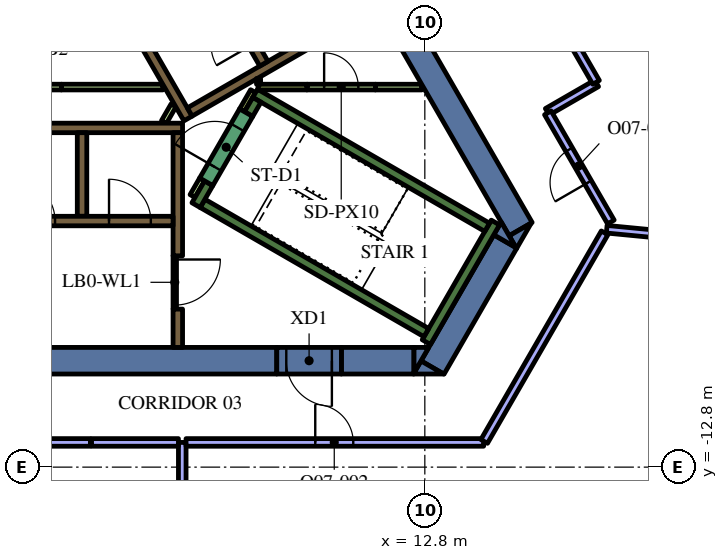
"""IFC4 building model, lengths in metres.
Left out: names, types, materials, properties, quantities, classifications, styles, units other than length and angle.
Written with IfcOpenShell. Run it as: python <this file> out.ifc"""

import sys

from ifc_helpers import new_model, si_unit, direction, frame, frame_2d, origin, place, context, subcontext, project, spatial, polyline, rectangle, outline, extrude, element, fill, save


model = new_model("IFC4")
c1 = context("Model", 3, precision=1e-05, world=origin(), true_north=direction((0.0, 1.0)))
c2 = subcontext(c1, "Body", "Model", "MODEL_VIEW")
j1 = project(units=[si_unit("LENGTHUNIT", "METRE"), si_unit("PLANEANGLEUNIT", "RADIAN")], contexts=[c1])
p1 = place(None, origin())
s1 = spatial("IfcSite", under=j1, at=p1, CompositionType="ELEMENT")
p2 = place(p1, origin())
s2 = spatial("IfcBuilding", under=s1, at=p2, CompositionType="ELEMENT")
p3 = place(p2, frame((0.0, 0.0, 214.2)))
s3 = spatial("IfcBuildingStorey", under=s2, at=p3, CompositionType="ELEMENT", Elevation=214.2)
p4 = place(p3, frame((9.085, 4.264, 0.0), z_axis=(0.0, 0.0, 1.0), x_axis=(0.499998082512, -0.866026510844, 0.0)))
e1 = element("IfcWall", 1, at=p4, inside=s3, PredefinedType="SOLIDWALL", context=c2, shape_type="SweptSolid", body=[
    extrude(rectangle(XDim=12.472, YDim=0.7, at=frame_2d((6.236, 0.0))), origin(), (0.0, 0.0, 1.0), 4.2),
])
p5 = place(p3, origin())
e2 = element("IfcWall", 2, at=p5, inside=s3, PredefinedType="SOLIDWALL", context=c2, shape_type="SweptSolid", body=[
    extrude(outline(polyline([(15.213, -7.05), (15.019, -6.714), (15.601, -6.378), (15.213, -7.05)])), origin(), (0.0, 0.0, 1.0), 4.2),
])
p6 = place(p3, frame((13.003, -10.179, 0.0), z_axis=(0.0, 0.0, 1.0), x_axis=(0.499972675833, 0.866041178825, 0.0)))
e3 = element("IfcWall", 3, at=p6, inside=s3, PredefinedType="SOLIDWALL", context=c2, shape_type="SweptSolid", body=[
    extrude(rectangle(XDim=3.829, YDim=0.7, at=frame_2d((1.915, 0.0))), origin(), (0.0, 0.0, 1.0), 4.2),
])
e4 = element("IfcWall", 4, at=p5, inside=s3, PredefinedType="SOLIDWALL", context=c2, shape_type="SweptSolid", body=[
    extrude(outline(polyline([(12.698, -10.005), (13.296, -10.35), (12.5, -10.35), (12.698, -10.005)])), origin(), (0.0, 0.0, 1.0), 4.2),
])
e5 = element("IfcWall", 5, at=p5, inside=s3, PredefinedType="SOLIDWALL", context=c2, shape_type="SweptSolid", body=[
    extrude(outline(polyline([(14.809, -6.35), (15.197, -7.022), (14.615, -6.686), (14.809, -6.35)])), origin(), (0.0, 0.0, 1.0), 4.2),
])
p7 = place(p3, frame((10.604, -10.0, 0.0), z_axis=(0.0, 0.0, 1.0), x_axis=(1.0, 0.0, 0.0)))
e6 = element("IfcWall", 6, at=p7, inside=s3, PredefinedType="SOLIDWALL", context=c2, shape_type="SweptSolid", body=[
    extrude(rectangle(XDim=1.909, YDim=0.7, at=frame_2d((0.955, 0.0))), origin(), (0.0, 0.0, 1.0), 4.2),
])
e7 = element("IfcWall", 7, at=p5, inside=s3, PredefinedType="SOLIDWALL", context=c2, shape_type="SweptSolid", body=[
    extrude(outline(polyline([(12.904, -9.65), (12.516, -10.322), (12.516, -9.65), (12.904, -9.65)])), origin(), (0.0, 0.0, 1.0), 4.2),
])
p8 = place(p3, frame((-10.556, -10.0, 0.0), z_axis=(0.0, 0.0, 1.0), x_axis=(1.0, 0.0, 0.0)))
e8 = element("IfcWall", 8, at=p8, inside=s3, PredefinedType="SOLIDWALL", context=c2, shape_type="SweptSolid", body=[
    extrude(rectangle(XDim=19.461, YDim=0.7, at=frame_2d((9.73, 0.0))), origin(), (0.0, 0.0, 1.0), 4.2),
])
p9 = place(p3, frame((12.84, -9.511, 0.0), z_axis=(0.0, 0.0, 1.0), x_axis=(0.500048121057, 0.865997619297, 0.0)))
e9 = element("IfcWall", 9, at=p9, inside=s3, PredefinedType="SOLIDWALL", context=c2, shape_type="SweptSolid", body=[
    extrude(rectangle(XDim=3.634, YDim=0.25, at=frame_2d((1.817, 0.0))), origin(), (0.0, 0.0, 1.0), 4.2),
])
p10 = place(p3, frame((12.84, -9.261, 0.0), z_axis=(0.0, 0.0, 1.0), x_axis=(-0.866013990052, 0.500019768644, 0.0)))
e10 = element("IfcWall", 10, at=p10, inside=s3, PredefinedType="SOLIDWALL", context=c2, shape_type="SweptSolid", body=[
    extrude(rectangle(XDim=6.8, YDim=0.25, at=frame_2d((3.4, 0.0))), origin(), (0.0, 0.0, 1.0), 4.2),
])
p11 = place(p3, frame((7.113, -5.33, 0.0), z_axis=(0.0, 0.0, 1.0), x_axis=(-0.499965889992, -0.866045096311, 0.0)))
e11 = element("IfcWall", 11, at=p11, inside=s3, PredefinedType="SOLIDWALL", context=c2, shape_type="SweptSolid", body=[
    extrude(rectangle(XDim=0.666, YDim=0.25, at=frame_2d((0.333, 0.0))), origin(), (0.0, 0.0, 1.0), 4.2),
])
p12 = place(p3, frame((8.334, -2.964, 0.0), z_axis=(0.0, 0.0, 1.0), x_axis=(0.866016039709, -0.500016218704, 0.0)))
e12 = element("IfcWall", 12, at=p12, inside=s3, PredefinedType="SOLIDWALL", context=c2, shape_type="SweptSolid", body=[
    extrude(rectangle(XDim=7.05, YDim=0.25, at=frame_2d((3.525, 0.0))), origin(), (0.0, 0.0, 1.0), 4.2),
])
p13 = place(p3, frame((8.163, -3.511, 0.0), z_axis=(0.0, 0.0, 1.0), x_axis=(0.500127794843, 0.865951608824, 0.0)))
e13 = element("IfcWall", 13, at=p13, inside=s3, PredefinedType="SOLIDWALL", context=c2, shape_type="SweptSolid", body=[
    extrude(rectangle(XDim=0.435, YDim=0.25, at=frame_2d((0.217, 0.0))), origin(), (0.0, 0.0, 1.0), 4.2),
])
p14 = place(p3, frame((-5.806, -3.875, 0.0), z_axis=(0.0, 0.0, 1.0), x_axis=(1.0, 0.0, 0.0)))
e14 = element("IfcWall", 14, at=p14, inside=s3, PredefinedType="SOLIDWALL", context=c2, shape_type="SweptSolid", body=[
    extrude(rectangle(XDim=12.231, YDim=0.25, at=frame_2d((6.116, 0.0))), origin(), (0.0, 0.0, 1.0), 4.2),
])
p15 = place(p3, frame((6.3, -7.24, 0.0), z_axis=(0.0, 0.0, 1.0), x_axis=(0.0, 1.0, 0.0)))
e15 = element("IfcWall", 15, at=p15, inside=s3, PredefinedType="SOLIDWALL", context=c2, shape_type="SweptSolid", body=[
    extrude(rectangle(XDim=3.24, YDim=0.25, at=frame_2d((1.62, 0.0))), origin(), (0.0, 0.0, 1.0), 4.2),
])
p16 = place(p3, frame((6.3, -9.65, 0.0), z_axis=(0.0, 0.0, 1.0), x_axis=(0.0, 1.0, 0.0)))
e16 = element("IfcWall", 16, at=p16, inside=s3, PredefinedType="SOLIDWALL", context=c2, shape_type="SweptSolid", body=[
    extrude(rectangle(XDim=1.008, YDim=0.25, at=frame_2d((0.504, 0.0))), origin(), (0.0, 0.0, 1.0), 4.2),
])
p17 = place(p3, frame((3.78, -4.0, 0.0), z_axis=(0.0, 0.0, 1.0), x_axis=(0.0, -1.0, 0.0)))
e17 = element("IfcWall", 17, at=p17, inside=s3, PredefinedType="SOLIDWALL", context=c2, shape_type="SweptSolid", body=[
    extrude(rectangle(XDim=2.2, YDim=0.25, at=frame_2d((1.1, 0.0))), origin(), (0.0, 0.0, 1.0), 4.2),
])
e18 = element("IfcWall", 18, at=p5, inside=s3, PredefinedType="SOLIDWALL", context=c2, shape_type="SweptSolid", body=[
    extrude(outline(polyline([(0.332, 6.925), (0.335, 6.925), (0.335, 6.925), (0.335, 6.925), (0.335, 7.075), (0.335, 7.075), (0.335, 7.075), (0.245, 7.075), (0.035, 7.439), (0.252, 7.564), (0.377, 7.348), (1.512, 5.382), (1.637, 5.165), (2.221, 4.153), (2.771, 3.199), (2.896, 2.983), (3.138, 2.564), (4.031, 1.017), (4.156, 0.801), (5.292, -1.165), (5.417, -1.382), (6.073, -2.519), (6.552, -3.348), (6.677, -3.564), (6.46, -3.689), (0.332, 6.925)])), origin(), (0.0, 0.0, 1.0), 4.2),
])
p18 = place(p3, frame((11.507, -0.631, 0.0), z_axis=(0.0, 0.0, 1.0), x_axis=(-0.866011447264, -0.500024172624, 0.0)))
e19 = element("IfcWall", 19, at=p18, inside=s3, PredefinedType="SOLIDWALL", context=c2, shape_type="SweptSolid", body=[
    extrude(rectangle(XDim=5.65, YDim=0.25, at=frame_2d((2.825, 0.0))), origin(), (0.0, 0.0, 1.0), 4.2),
])
p19 = place(p3, frame((3.238, -2.8, 0.0), z_axis=(0.0, 0.0, 1.0), x_axis=(1.0, 0.0, 0.0)))
e20 = element("IfcWall", 20, at=p19, inside=s3, PredefinedType="PARTITIONING", context=c2, shape_type="SweptSolid", body=[
    extrude(rectangle(XDim=2.672, YDim=0.15, at=frame_2d((1.336, 0.0))), origin(), (0.0, 0.0, 1.0), 3.45),
])
p20 = place(p3, frame((8.412, -2.8, 0.0), z_axis=(0.0, 0.0, 1.0), x_axis=(1.0, 0.0, 0.0)))
e21 = element("IfcWall", 21, at=p20, inside=s3, PredefinedType="PARTITIONING", context=c2, shape_type="SweptSolid", body=[
    extrude(rectangle(XDim=1.288, YDim=0.15, at=frame_2d((0.644, 0.0))), origin(), (0.0, 0.0, 1.0), 4.2),
])
p21 = place(p3, frame((8.37, -2.65, 0.0), z_axis=(0.0, 0.0, 1.0), x_axis=(1.0, 0.0, 0.0)))
e22 = element("IfcWall", 22, at=p21, inside=s3, PredefinedType="PARTITIONING", context=c2, shape_type="SweptSolid", body=[
    extrude(rectangle(XDim=0.108, YDim=0.15, at=frame_2d((0.054, 0.0))), origin(), (0.0, 0.0, 1.0), 4.2),
])
p22 = place(p3, frame((8.281, -2.907, 0.0), z_axis=(0.0, 0.0, 1.0), x_axis=(-0.500193841991, -0.86591346013, 0.0)))
e23 = element("IfcWall", 23, at=p22, inside=s3, PredefinedType="PARTITIONING", context=c2, shape_type="SweptSolid", body=[
    extrude(rectangle(XDim=0.583, YDim=0.15, at=frame_2d((0.292, 0.0))), origin(), (0.0, 0.0, 1.0), 4.2),
])
p23 = place(p3, frame((11.5, -2.801, 0.0), z_axis=(0.0, 0.0, 1.0), x_axis=(1.0, 0.0, 0.0)))
e24 = element("IfcWall", 24, at=p23, inside=s3, PredefinedType="PARTITIONING", context=c2, shape_type="SweptSolid", body=[
    extrude(rectangle(XDim=1.222, YDim=0.15, at=frame_2d((0.611, 0.0))), origin(), (0.0, 0.0, 1.0), 3.45),
])
p24 = place(p3, frame((6.688, -5.667, 0.0), z_axis=(0.0, 0.0, 1.0), x_axis=(0.499834152157, 0.86612113491, 0.0)))
e25 = element("IfcWall", 25, at=p24, inside=s3, PredefinedType="PARTITIONING", context=c2, shape_type="SweptSolid", body=[
    extrude(rectangle(XDim=0.505, YDim=0.15, at=frame_2d((0.252, 0.0))), origin(), (0.0, 0.0, 1.0), 3.45),
])
p25 = place(p3, frame((5.936, -3.718, 0.0), z_axis=(0.0, 0.0, 1.0), x_axis=(0.499890179513, 0.866088799389, 0.0)))
e26 = element("IfcWall", 26, at=p25, inside=s3, PredefinedType="PARTITIONING", context=c2, shape_type="SweptSolid", body=[
    extrude(rectangle(XDim=0.504, YDim=0.15, at=frame_2d((0.252, 0.0))), origin(), (0.0, 0.0, 1.0), 3.45),
])
p26 = place(p3, frame((-6.175, -6.325, 0.0), z_axis=(0.0, 0.0, 1.0), x_axis=(1.0, 0.0, 0.0)))
e27 = element("IfcWall", 27, at=p26, inside=s3, PredefinedType="SOLIDWALL", context=c2, shape_type="SweptSolid", body=[
    extrude(rectangle(XDim=12.35, YDim=0.25, at=frame_2d((6.175, 0.0))), origin(), (0.0, 0.0, 1.0), 4.2),
])
p27 = place(p26, frame((0.585, 0.0, 0.0)))
e28 = element("IfcOpeningElement", 28, at=p27, cuts=e27, PredefinedType="OPENING", context=c2, shape_type="SweptSolid", body=[
    extrude(rectangle(XDim=1.1, YDim=2.1, at=frame_2d((0.55, 1.05))), frame((0.0, 0.135, 0.0), z_axis=(0.0, -1.0, 0.0), x_axis=(1.0, 0.0, 0.0)), (0.0, 0.0, 1.0), 0.27),
])
p28 = place(p26, frame((3.105, 0.0, 0.0)))
e29 = element("IfcOpeningElement", 29, at=p28, cuts=e27, PredefinedType="OPENING", context=c2, shape_type="SweptSolid", body=[
    extrude(rectangle(XDim=1.1, YDim=2.1, at=frame_2d((0.55, 1.05))), frame((0.0, 0.135, 0.0), z_axis=(0.0, -1.0, 0.0), x_axis=(1.0, 0.0, 0.0)), (0.0, 0.0, 1.0), 0.27),
])
p29 = place(p26, frame((5.625, 0.0, 0.0)))
e30 = element("IfcOpeningElement", 30, at=p29, cuts=e27, PredefinedType="OPENING", context=c2, shape_type="SweptSolid", body=[
    extrude(rectangle(XDim=1.1, YDim=2.1, at=frame_2d((0.55, 1.05))), frame((0.0, 0.135, 0.0), z_axis=(0.0, -1.0, 0.0), x_axis=(1.0, 0.0, 0.0)), (0.0, 0.0, 1.0), 0.27),
])
p30 = place(p26, frame((8.145, 0.0, 0.0)))
e31 = element("IfcOpeningElement", 31, at=p30, cuts=e27, PredefinedType="OPENING", context=c2, shape_type="SweptSolid", body=[
    extrude(rectangle(XDim=1.1, YDim=2.1, at=frame_2d((0.55, 1.05))), frame((0.0, 0.135, 0.0), z_axis=(0.0, -1.0, 0.0), x_axis=(1.0, 0.0, 0.0)), (0.0, 0.0, 1.0), 0.27),
])
p31 = place(p26, frame((10.665, 0.0, 0.0)))
e32 = element("IfcOpeningElement", 32, at=p31, cuts=e27, PredefinedType="OPENING", context=c2, shape_type="SweptSolid", body=[
    extrude(rectangle(XDim=1.1, YDim=2.1, at=frame_2d((0.55, 1.05))), frame((0.0, 0.135, 0.0), z_axis=(0.0, -1.0, 0.0), x_axis=(1.0, 0.0, 0.0)), (0.0, 0.0, 1.0), 0.27),
])
p32 = place(p3, frame((8.565, -2.185, 0.0), z_axis=(0.0, 0.0, 1.0), x_axis=(-0.499997954832, 0.866026584559, 0.0)))
e33 = element("IfcWall", 33, at=p32, inside=s3, PredefinedType="SOLIDWALL", context=c2, shape_type="SweptSolid", body=[
    extrude(rectangle(XDim=12.35, YDim=0.25, at=frame_2d((6.175, 0.0))), origin(), (0.0, 0.0, 1.0), 4.2),
])
p33 = place(p32, frame((0.585, 0.0, 0.0)))
e34 = element("IfcOpeningElement", 34, at=p33, cuts=e33, PredefinedType="OPENING", context=c2, shape_type="SweptSolid", body=[
    extrude(rectangle(XDim=1.1, YDim=2.1, at=frame_2d((0.55, 1.05))), frame((0.0, 0.135, 0.0), z_axis=(0.0, -1.0, 0.0), x_axis=(1.0, 0.0, 0.0)), (0.0, 0.0, 1.0), 0.27),
])
p34 = place(p3, frame((7.048, -5.292, 0.0), z_axis=(0.0, 0.0, 1.0), x_axis=(0.49994051562, 0.866059744384, 0.0)))
e35 = element("IfcWall", 35, at=p34, inside=s3, PredefinedType="SOLIDWALL", context=c2, shape_type="SweptSolid", body=[
    extrude(rectangle(XDim=2.1, YDim=0.4, at=frame_2d((1.05, 0.0))), origin(), (0.0, 0.0, 1.0), 4.2),
])
p35 = place(p34, frame((0.45, 0.0, 0.0)))
e36 = element("IfcOpeningElement", 36, at=p35, cuts=e35, PredefinedType="OPENING", context=c2, shape_type="SweptSolid", body=[
    extrude(rectangle(XDim=1.2, YDim=2.1, at=frame_2d((0.6, 1.05))), frame((0.0, 0.21, 0.0), z_axis=(0.0, -1.0, 0.0), x_axis=(1.0, 0.0, 0.0)), (0.0, 0.0, 1.0), 0.42),
])
p36 = place(p3, frame((6.22, -7.237, 0.0), z_axis=(0.0, 0.0, 1.0), x_axis=(0.0, -1.0, 0.0)))
e37 = element("IfcWall", 37, at=p36, inside=s3, PredefinedType="PARTITIONING", context=c2, shape_type="SweptSolid", body=[
    extrude(rectangle(XDim=1.4, YDim=0.09, at=frame_2d((0.7, 0.0))), origin(), (0.0, 0.0, 1.0), 3.45),
])
p37 = place(p36, frame((0.1, 0.0, 0.0)))
e38 = element("IfcOpeningElement", 38, at=p37, cuts=e37, PredefinedType="OPENING", context=c2, shape_type="SweptSolid", body=[
    extrude(rectangle(XDim=1.2, YDim=2.1, at=frame_2d((0.6, 1.05))), frame((0.0, 0.055, 0.0), z_axis=(0.0, -1.0, 0.0), x_axis=(1.0, 0.0, 0.0)), (0.0, 0.0, 1.0), 0.11),
])
p38 = place(p3, frame((10.604, -10.0, 0.0), z_axis=(0.0, 0.0, 1.0), x_axis=(-1.0, 0.0, 0.0)))
e39 = element("IfcWall", 39, at=p38, inside=s3, PredefinedType="SOLIDWALL", context=c2, shape_type="SweptSolid", body=[
    extrude(rectangle(XDim=1.7, YDim=0.7, at=frame_2d((0.85, 0.0))), origin(), (0.0, 0.0, 1.0), 4.2),
])
p39 = place(p38, frame((0.25, 0.0, 0.0)))
e40 = element("IfcOpeningElement", 40, at=p39, cuts=e39, PredefinedType="OPENING", context=c2, shape_type="SweptSolid", body=[
    extrude(rectangle(XDim=1.2, YDim=2.1, at=frame_2d((0.6, 1.05))), frame((0.0, 0.36, 0.0), z_axis=(0.0, -1.0, 0.0), x_axis=(1.0, 0.0, 0.0)), (0.0, 0.0, 1.0), 0.72),
])
p40 = place(p3, frame((1.438, -2.8, 0.0), z_axis=(0.0, 0.0, 1.0), x_axis=(1.0, 0.0, 0.0)))
e41 = element("IfcWall", 41, at=p40, inside=s3, PredefinedType="PARTITIONING", context=c2, shape_type="SweptSolid", body=[
    extrude(rectangle(XDim=1.8, YDim=0.15, at=frame_2d((0.9, 0.0))), origin(), (0.0, 0.0, 1.0), 3.45),
])
p41 = place(p40, frame((0.45, 0.0, 0.0)))
e42 = element("IfcOpeningElement", 42, at=p41, cuts=e41, PredefinedType="OPENING", context=c2, shape_type="SweptSolid", body=[
    extrude(rectangle(XDim=0.9, YDim=2.1, at=frame_2d((0.45, 1.05))), frame((0.0, 0.085, 0.0), z_axis=(0.0, -1.0, 0.0), x_axis=(1.0, 0.0, 0.0)), (0.0, 0.0, 1.0), 0.17),
])
p42 = place(p3, frame((9.7, -2.8, 0.0), z_axis=(0.0, 0.0, 1.0), x_axis=(1.0, 0.0, 0.0)))
e43 = element("IfcWall", 43, at=p42, inside=s3, PredefinedType="PARTITIONING", context=c2, shape_type="SweptSolid", body=[
    extrude(rectangle(XDim=1.8, YDim=0.15, at=frame_2d((0.9, 0.0))), origin(), (0.0, 0.0, 1.0), 3.45),
])
p43 = place(p42, frame((0.45, 0.0, 0.0)))
e44 = element("IfcOpeningElement", 44, at=p43, cuts=e43, PredefinedType="OPENING", context=c2, shape_type="SweptSolid", body=[
    extrude(rectangle(XDim=0.9, YDim=2.1, at=frame_2d((0.45, 1.05))), frame((0.0, 0.085, 0.0), z_axis=(0.0, -1.0, 0.0), x_axis=(1.0, 0.0, 0.0)), (0.0, 0.0, 1.0), 0.17),
])
p44 = place(p3, frame((6.417, -12.15, 0.0), z_axis=(0.0, 0.0, 1.0), x_axis=(0.0, -1.0, 0.0)))
e45 = element("IfcWall", 45, at=p44, inside=s3, PredefinedType="PARTITIONING", context=c2, shape_type="SweptSolid", body=[
    extrude(rectangle(XDim=6.747, YDim=0.2, at=frame_2d((3.374, 0.0))), origin(), (0.0, 0.0, 1.0), 3.45),
])
p45 = place(p3, frame((-3.108, -12.15, 0.0), z_axis=(0.0, 0.0, 1.0), x_axis=(1.0, 0.0, 0.0)))
e46 = element("IfcWall", 46, at=p45, inside=s3, PredefinedType="PARTITIONING", context=c2, shape_type="SweptSolid", body=[
    extrude(rectangle(XDim=7.108, YDim=0.2, at=frame_2d((3.554, 0.0))), origin(), (0.0, 0.0, 1.0), 3.45),
])
p46 = place(p45, frame((3.1, 0.0, 0.0)))
e47 = element("IfcOpeningElement", 47, at=p46, cuts=e46, PredefinedType="OPENING", context=c2, shape_type="SweptSolid", body=[
    extrude(rectangle(XDim=1.0, YDim=2.1, at=frame_2d((0.5, 1.05))), frame((0.0, 0.11, 0.0), z_axis=(0.0, -1.0, 0.0), x_axis=(1.0, 0.0, 0.0)), (0.0, 0.0, 1.0), 0.22),
])
p47 = place(p3, frame((4.03, -12.15, 0.0), z_axis=(0.0, 0.0, 1.0), x_axis=(1.0, 0.0, 0.0)))
e48 = element("IfcWall", 48, at=p47, inside=s3, PredefinedType="PARTITIONING", context=c2, shape_type="SweptSolid", body=[
    extrude(rectangle(XDim=2.287, YDim=0.2, at=frame_2d((1.144, 0.0))), origin(), (0.0, 0.0, 1.0), 3.45),
])
p48 = place(p3, frame((17.586, -6.54, 0.0), z_axis=(0.0, 0.0, 1.0), x_axis=(0.995357542522, -0.096246363795, 0.0)))
e49 = element("IfcWall", 49, at=p48, inside=s3, PredefinedType="PARTITIONING", context=c2, shape_type="SweptSolid", body=[
    extrude(rectangle(XDim=7.318, YDim=0.2, at=frame_2d((3.659, 0.0))), origin(), (0.0, 0.0, 1.0), 3.45),
])
p49 = place(p3, frame((6.517, -12.15, 0.0), z_axis=(0.0, 0.0, 1.0), x_axis=(1.0, 0.0, 0.0)))
e50 = element("IfcWall", 50, at=p49, inside=s3, PredefinedType="PARTITIONING", context=c2, shape_type="SweptSolid", body=[
    extrude(rectangle(XDim=7.83, YDim=0.2, at=frame_2d((3.915, 0.0))), origin(), (0.0, 0.0, 1.0), 3.45),
])
p50 = place(p49, frame((3.4, 0.0, 0.0)))
e51 = element("IfcOpeningElement", 51, at=p50, cuts=e50, PredefinedType="OPENING", context=c2, shape_type="SweptSolid", body=[
    extrude(rectangle(XDim=1.0, YDim=2.1, at=frame_2d((0.5, 1.05))), frame((0.0, 0.11, 0.0), z_axis=(0.0, -1.0, 0.0), x_axis=(1.0, 0.0, 0.0)), (0.0, 0.0, 1.0), 0.22),
])
p51 = place(p3, frame((14.362, -12.124, 0.0), z_axis=(0.0, 0.0, 1.0), x_axis=(0.500017005442, 0.866015585465, 0.0)))
e52 = element("IfcWall", 52, at=p51, inside=s3, PredefinedType="PARTITIONING", context=c2, shape_type="SweptSolid", body=[
    extrude(rectangle(XDim=6.338, YDim=0.2, at=frame_2d((3.169, 0.0))), origin(), (0.0, 0.0, 1.0), 3.45),
])
p52 = place(p3, frame((16.022, -3.451, 0.0), z_axis=(0.0, 0.0, 1.0), x_axis=(0.866031096941, 0.499990139034, 0.0)))
e53 = element("IfcWall", 53, at=p52, inside=s3, PredefinedType="PARTITIONING", context=c2, shape_type="SweptSolid", body=[
    extrude(rectangle(XDim=1.5, YDim=0.2, at=frame_2d((0.75, 0.0))), origin(), (0.0, 0.0, 1.0), 3.45),
])
p53 = place(p3, frame((17.306, -2.675, 0.0), z_axis=(0.0, 0.0, 1.0), x_axis=(-0.499919672301, 0.866071776036, 0.0)))
e54 = element("IfcWall", 54, at=p53, inside=s3, PredefinedType="PARTITIONING", context=c2, shape_type="SweptSolid", body=[
    extrude(rectangle(XDim=1.25, YDim=0.2, at=frame_2d((0.625, 0.0))), origin(), (0.0, 0.0, 1.0), 3.45),
])
p54 = place(p3, frame((17.696, -6.35, 0.0), z_axis=(0.0, 0.0, 1.0), x_axis=(-0.500017629075, 0.866015225394, 0.0)))
e55 = element("IfcWall", 55, at=p54, inside=s3, PredefinedType="PARTITIONING", context=c2, shape_type="SweptSolid", body=[
    extrude(rectangle(XDim=3.317, YDim=0.2, at=frame_2d((1.659, 0.0))), origin(), (0.0, 0.0, 1.0), 3.45),
])
p55 = place(p54, frame((1.2, 0.0, 0.0)))
e56 = element("IfcOpeningElement", 56, at=p55, cuts=e55, PredefinedType="OPENING", context=c2, shape_type="SweptSolid", body=[
    extrude(rectangle(XDim=1.0, YDim=2.1, at=frame_2d((0.5, 1.05))), frame((0.0, 0.11, 0.0), z_axis=(0.0, -1.0, 0.0), x_axis=(1.0, 0.0, 0.0)), (0.0, 0.0, 1.0), 0.22),
])
p56 = place(p30, origin())
e57 = element("IfcDoor", 57, at=p56, inside=s3, OperationType="DOUBLE_DOOR_SLIDING", PredefinedType="DOOR", context=c2, shape_type="SweptSolid", body=[
    extrude(rectangle(XDim=1.1, YDim=2.1, at=frame_2d((0.55, 1.05))), frame((0.0, 0.025, 0.0), z_axis=(0.0, -1.0, 0.0), x_axis=(1.0, 0.0, 0.0)), (0.0, 0.0, 1.0), 0.05),
])
fill(e31, e57)
p57 = place(p31, origin())
e58 = element("IfcDoor", 58, at=p57, inside=s3, OperationType="DOUBLE_DOOR_SLIDING", PredefinedType="DOOR", context=c2, shape_type="SweptSolid", body=[
    extrude(rectangle(XDim=1.1, YDim=2.1, at=frame_2d((0.55, 1.05))), frame((0.0, 0.025, 0.0), z_axis=(0.0, -1.0, 0.0), x_axis=(1.0, 0.0, 0.0)), (0.0, 0.0, 1.0), 0.05),
])
fill(e32, e58)
p58 = place(p35, origin())
e59 = element("IfcDoor", 59, at=p58, inside=s3, OperationType="SINGLE_SWING_LEFT", PredefinedType="DOOR", context=c2, shape_type="SweptSolid", body=[
    extrude(rectangle(XDim=1.2, YDim=2.1, at=frame_2d((0.6, 1.05))), frame((0.0, 0.025, 0.0), z_axis=(0.0, -1.0, 0.0), x_axis=(1.0, 0.0, 0.0)), (0.0, 0.0, 1.0), 0.05),
])
fill(e36, e59)
p59 = place(p37, origin())
e60 = element("IfcDoor", 60, at=p59, inside=s3, OperationType="SINGLE_SWING_LEFT", PredefinedType="DOOR", context=c2, shape_type="SweptSolid", body=[
    extrude(rectangle(XDim=1.2, YDim=2.1, at=frame_2d((0.6, 1.05))), frame((0.0, 0.025, 0.0), z_axis=(0.0, -1.0, 0.0), x_axis=(1.0, 0.0, 0.0)), (0.0, 0.0, 1.0), 0.05),
])
fill(e38, e60)
p60 = place(p39, origin())
e61 = element("IfcDoor", 61, at=p60, inside=s3, OperationType="SINGLE_SWING_LEFT", PredefinedType="DOOR", context=c2, shape_type="SweptSolid", body=[
    extrude(rectangle(XDim=1.2, YDim=2.1, at=frame_2d((0.6, 1.05))), frame((0.0, 0.025, 0.0), z_axis=(0.0, -1.0, 0.0), x_axis=(1.0, 0.0, 0.0)), (0.0, 0.0, 1.0), 0.05),
])
fill(e40, e61)
p61 = place(p43, origin())
e62 = element("IfcDoor", 62, at=p61, inside=s3, OperationType="SINGLE_SWING_LEFT", PredefinedType="DOOR", context=c2, shape_type="SweptSolid", body=[
    extrude(rectangle(XDim=0.9, YDim=2.1, at=frame_2d((0.45, 1.05))), frame((0.0, 0.025, 0.0), z_axis=(0.0, -1.0, 0.0), x_axis=(1.0, 0.0, 0.0)), (0.0, 0.0, 1.0), 0.05),
])
fill(e44, e62)
p62 = place(p50, origin())
e63 = element("IfcDoor", 63, at=p62, inside=s3, OperationType="SINGLE_SWING_LEFT", PredefinedType="DOOR", context=c2, shape_type="SweptSolid", body=[
    extrude(rectangle(XDim=1.0, YDim=2.1, at=frame_2d((0.5, 1.05))), frame((0.0, 0.025, 0.0), z_axis=(0.0, -1.0, 0.0), x_axis=(1.0, 0.0, 0.0)), (0.0, 0.0, 1.0), 0.05),
])
fill(e51, e63)
p63 = place(p55, origin())
e64 = element("IfcDoor", 64, at=p63, inside=s3, OperationType="SINGLE_SWING_RIGHT", PredefinedType="DOOR", context=c2, shape_type="SweptSolid", body=[
    extrude(rectangle(XDim=1.0, YDim=2.1, at=frame_2d((0.5, 1.05))), frame((0.0, 0.025, 0.0), z_axis=(0.0, -1.0, 0.0), x_axis=(1.0, 0.0, 0.0)), (0.0, 0.0, 1.0), 0.05),
])
fill(e56, e64)
save(model, sys.argv[1])
